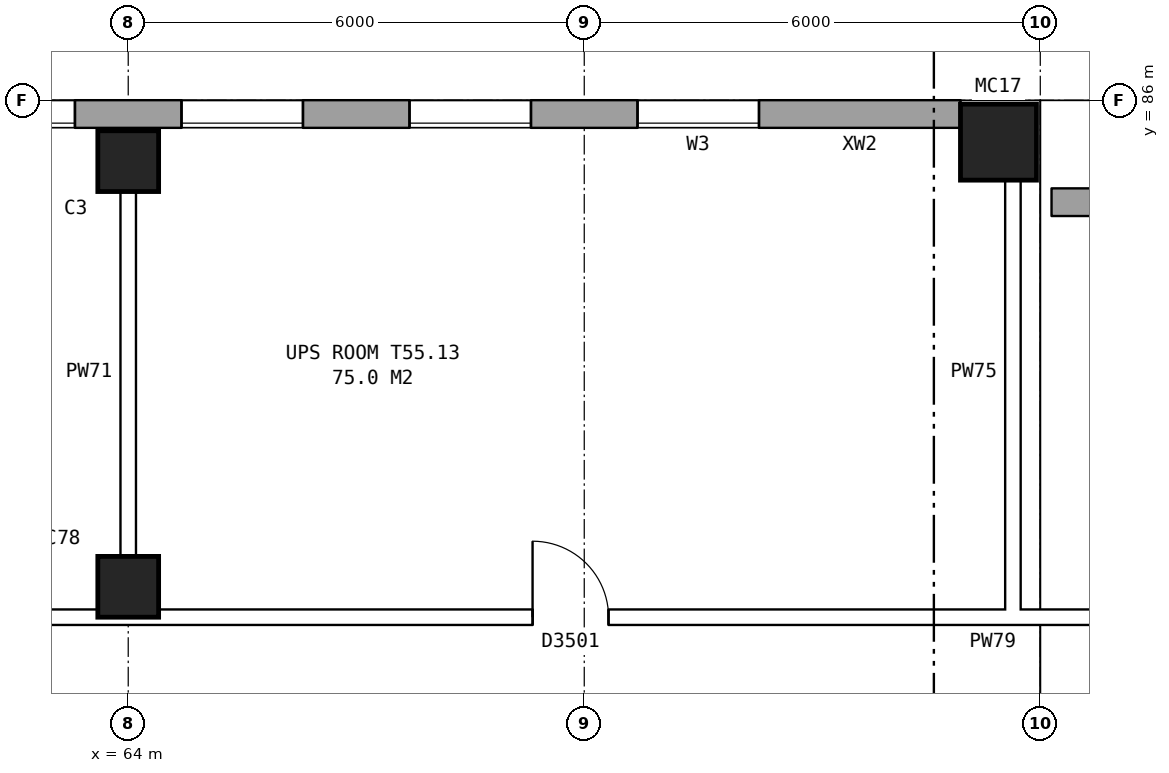
"""IFC4 building model, lengths in metres.
Left out: names, types, materials, properties, quantities, classifications, styles, units other than length and angle.
Written with IfcOpenShell. Run it as: python <this file> out.ifc"""

import sys

from ifc_helpers import new_model, si_unit, direction, frame, frame_2d, origin, origin_2d, place, context, subcontext, project, spatial, rectangle, hollow_rectangle, extrude, element, fill, save


model = new_model("IFC4")
c1 = context("Model", 3, precision=1e-05, world=origin(), true_north=direction((0.0, 1.0)))
c2 = subcontext(c1, "Body", "Model", "MODEL_VIEW")
j1 = project(units=[si_unit("LENGTHUNIT", "METRE"), si_unit("PLANEANGLEUNIT", "RADIAN")], contexts=[c1])
p1 = place(None, origin())
s1 = spatial("IfcSite", under=j1, at=p1, CompositionType="ELEMENT")
p2 = place(p1, origin())
s2 = spatial("IfcBuilding", under=s1, at=p2, CompositionType="ELEMENT")
p3 = place(p2, frame((0.0, 0.0, 194.4)))
s3 = spatial("IfcBuildingStorey", under=s2, at=p3, CompositionType="ELEMENT", Elevation=194.4)
for number, where, z_axis, x_axis in (
    (1, (64.0, 79.6, 0.0), (0.0, 0.0, 1.0), (1.0, 0.0, 0.0)),
    (2, (64.0, 85.2, 0.0), (0.0, 0.0, 1.0), (1.0, 0.0, 0.0)),
):
    element("IfcColumn", number, at=place(p3, frame(where, z_axis=z_axis, x_axis=x_axis)), inside=s3, PredefinedType="COLUMN", context=c2, shape_type="SweptSolid", body=[
        extrude(rectangle(XDim=0.8, YDim=0.8, at=origin_2d()), origin(), (0.0, 0.0, 1.0), 3.95),
    ])
p4 = place(p3, frame((75.45, 85.45, 0.0), z_axis=(0.0, 0.0, 1.0), x_axis=(1.0, 0.0, 0.0)))
e3 = element("IfcColumn", 3, at=p4, inside=s3, PredefinedType="COLUMN", context=c2, shape_type="SweptSolid", body=[
    extrude(hollow_rectangle(XDim=1.0, YDim=1.0, WallThickness=0.055, at=origin_2d()), origin(), (0.0, 0.0, 1.0), 4.2),
])
p5 = place(p3, frame((130.85, 84.66, 0.0), z_axis=(0.0, 0.0, 1.0), x_axis=(-1.0, 0.0, 0.0)))
e4 = element("IfcWall", 4, at=p5, inside=s3, PredefinedType="STANDARD", context=c2, shape_type="SweptSolid", body=[
    extrude(rectangle(XDim=54.7, YDim=0.36, at=frame_2d((27.35, 0.0))), origin(), (0.0, 0.0, 1.0), 3.95),
])
p6 = place(p5, frame((0.769, 0.0, 1.5)))
e5 = element("IfcOpeningElement", 5, at=p6, cuts=e4, PredefinedType="OPENING", context=c2, shape_type="SweptSolid", body=[
    extrude(rectangle(XDim=1.6, YDim=1.2, at=frame_2d((0.8, 0.6))), frame((0.0, 0.19, 0.0), z_axis=(0.0, -1.0, 0.0), x_axis=(1.0, 0.0, 0.0)), (0.0, 0.0, 1.0), 0.38),
])
p7 = place(p5, frame((2.7, 0.0, 1.5)))
e6 = element("IfcOpeningElement", 6, at=p7, cuts=e4, PredefinedType="OPENING", context=c2, shape_type="SweptSolid", body=[
    extrude(rectangle(XDim=0.6, YDim=1.2, at=frame_2d((0.3, 0.6))), frame((0.0, 0.19, 0.0), z_axis=(0.0, -1.0, 0.0), x_axis=(1.0, 0.0, 0.0)), (0.0, 0.0, 1.0), 0.38),
])
p8 = place(p5, frame((7.644, 0.0, 1.5)))
e7 = element("IfcOpeningElement", 7, at=p8, cuts=e4, PredefinedType="OPENING", context=c2, shape_type="SweptSolid", body=[
    extrude(rectangle(XDim=1.6, YDim=1.2, at=frame_2d((0.8, 0.6))), frame((0.0, 0.19, 0.0), z_axis=(0.0, -1.0, 0.0), x_axis=(1.0, 0.0, 0.0)), (0.0, 0.0, 1.0), 0.38),
])
p9 = place(p5, frame((5.3, 0.0, 1.5)))
e8 = element("IfcOpeningElement", 8, at=p9, cuts=e4, PredefinedType="OPENING", context=c2, shape_type="SweptSolid", body=[
    extrude(rectangle(XDim=1.6, YDim=1.2, at=frame_2d((0.8, 0.6))), frame((0.0, 0.19, 0.0), z_axis=(0.0, -1.0, 0.0), x_axis=(1.0, 0.0, 0.0)), (0.0, 0.0, 1.0), 0.38),
])
p10 = place(p5, frame((14.519, 0.0, 1.5)))
e9 = element("IfcOpeningElement", 9, at=p10, cuts=e4, PredefinedType="OPENING", context=c2, shape_type="SweptSolid", body=[
    extrude(rectangle(XDim=1.6, YDim=1.2, at=frame_2d((0.8, 0.6))), frame((0.0, 0.19, 0.0), z_axis=(0.0, -1.0, 0.0), x_axis=(1.0, 0.0, 0.0)), (0.0, 0.0, 1.0), 0.38),
])
p11 = place(p5, frame((16.45, 0.0, 1.5)))
e10 = element("IfcOpeningElement", 10, at=p11, cuts=e4, PredefinedType="OPENING", context=c2, shape_type="SweptSolid", body=[
    extrude(rectangle(XDim=0.6, YDim=1.2, at=frame_2d((0.3, 0.6))), frame((0.0, 0.19, 0.0), z_axis=(0.0, -1.0, 0.0), x_axis=(1.0, 0.0, 0.0)), (0.0, 0.0, 1.0), 0.38),
])
p12 = place(p5, frame((21.394, 0.0, 1.5)))
e11 = element("IfcOpeningElement", 11, at=p12, cuts=e4, PredefinedType="OPENING", context=c2, shape_type="SweptSolid", body=[
    extrude(rectangle(XDim=1.6, YDim=1.2, at=frame_2d((0.8, 0.6))), frame((0.0, 0.19, 0.0), z_axis=(0.0, -1.0, 0.0), x_axis=(1.0, 0.0, 0.0)), (0.0, 0.0, 1.0), 0.38),
])
p13 = place(p5, frame((19.05, 0.0, 1.5)))
e12 = element("IfcOpeningElement", 12, at=p13, cuts=e4, PredefinedType="OPENING", context=c2, shape_type="SweptSolid", body=[
    extrude(rectangle(XDim=1.6, YDim=1.2, at=frame_2d((0.8, 0.6))), frame((0.0, 0.19, 0.0), z_axis=(0.0, -1.0, 0.0), x_axis=(1.0, 0.0, 0.0)), (0.0, 0.0, 1.0), 0.38),
])
p14 = place(p5, frame((27.55, 0.0, 1.5)))
e13 = element("IfcOpeningElement", 13, at=p14, cuts=e4, PredefinedType="OPENING", context=c2, shape_type="SweptSolid", body=[
    extrude(rectangle(XDim=1.2, YDim=1.2, at=frame_2d((0.6, 0.6))), frame((0.0, 0.19, 0.0), z_axis=(0.0, -1.0, 0.0), x_axis=(1.0, 0.0, 0.0)), (0.0, 0.0, 1.0), 0.38),
])
p15 = place(p5, frame((31.706, 0.0, 1.5)))
e14 = element("IfcOpeningElement", 14, at=p15, cuts=e4, PredefinedType="OPENING", context=c2, shape_type="SweptSolid", body=[
    extrude(rectangle(XDim=1.6, YDim=1.2, at=frame_2d((0.8, 0.6))), frame((0.0, 0.19, 0.0), z_axis=(0.0, -1.0, 0.0), x_axis=(1.0, 0.0, 0.0)), (0.0, 0.0, 1.0), 0.38),
])
p16 = place(p5, frame((30.65, 0.0, 1.5)))
e15 = element("IfcOpeningElement", 15, at=p16, cuts=e4, PredefinedType="OPENING", context=c2, shape_type="SweptSolid", body=[
    extrude(rectangle(XDim=0.6, YDim=1.2, at=frame_2d((0.3, 0.6))), frame((0.0, 0.19, 0.0), z_axis=(0.0, -1.0, 0.0), x_axis=(1.0, 0.0, 0.0)), (0.0, 0.0, 1.0), 0.38),
])
p17 = place(p5, frame((38.581, 0.0, 1.5)))
e16 = element("IfcOpeningElement", 16, at=p17, cuts=e4, PredefinedType="OPENING", context=c2, shape_type="SweptSolid", body=[
    extrude(rectangle(XDim=1.6, YDim=1.2, at=frame_2d((0.8, 0.6))), frame((0.0, 0.19, 0.0), z_axis=(0.0, -1.0, 0.0), x_axis=(1.0, 0.0, 0.0)), (0.0, 0.0, 1.0), 0.38),
])
p18 = place(p5, frame((41.3, 0.0, 1.5)))
e17 = element("IfcOpeningElement", 17, at=p18, cuts=e4, PredefinedType="OPENING", context=c2, shape_type="SweptSolid", body=[
    extrude(rectangle(XDim=1.2, YDim=1.2, at=frame_2d((0.6, 0.6))), frame((0.0, 0.19, 0.0), z_axis=(0.0, -1.0, 0.0), x_axis=(1.0, 0.0, 0.0)), (0.0, 0.0, 1.0), 0.38),
])
p19 = place(p5, frame((45.456, 0.0, 1.5)))
e18 = element("IfcOpeningElement", 18, at=p19, cuts=e4, PredefinedType="OPENING", context=c2, shape_type="SweptSolid", body=[
    extrude(rectangle(XDim=1.6, YDim=1.2, at=frame_2d((0.8, 0.6))), frame((0.0, 0.19, 0.0), z_axis=(0.0, -1.0, 0.0), x_axis=(1.0, 0.0, 0.0)), (0.0, 0.0, 1.0), 0.38),
])
p20 = place(p5, frame((44.4, 0.0, 1.5)))
e19 = element("IfcOpeningElement", 19, at=p20, cuts=e4, PredefinedType="OPENING", context=c2, shape_type="SweptSolid", body=[
    extrude(rectangle(XDim=0.6, YDim=1.2, at=frame_2d((0.3, 0.6))), frame((0.0, 0.19, 0.0), z_axis=(0.0, -1.0, 0.0), x_axis=(1.0, 0.0, 0.0)), (0.0, 0.0, 1.0), 0.38),
])
p21 = place(p5, frame((52.331, 0.0, 1.5)))
e20 = element("IfcOpeningElement", 20, at=p21, cuts=e4, PredefinedType="OPENING", context=c2, shape_type="SweptSolid", body=[
    extrude(rectangle(XDim=1.6, YDim=1.2, at=frame_2d((0.8, 0.6))), frame((0.0, 0.19, 0.0), z_axis=(0.0, -1.0, 0.0), x_axis=(1.0, 0.0, 0.0)), (0.0, 0.0, 1.0), 0.38),
])
p22 = place(p5, frame((9.55, 0.0, 1.5)))
e21 = element("IfcOpeningElement", 21, at=p22, cuts=e4, PredefinedType="OPENING", context=c2, shape_type="SweptSolid", body=[
    extrude(rectangle(XDim=0.6, YDim=1.2, at=frame_2d((0.3, 0.6))), frame((0.0, 0.19, 0.0), z_axis=(0.0, -1.0, 0.0), x_axis=(1.0, 0.0, 0.0)), (0.0, 0.0, 1.0), 0.38),
])
p23 = place(p5, frame((12.15, 0.0, 1.5)))
e22 = element("IfcOpeningElement", 22, at=p23, cuts=e4, PredefinedType="OPENING", context=c2, shape_type="SweptSolid", body=[
    extrude(rectangle(XDim=1.2, YDim=1.2, at=frame_2d((0.6, 0.6))), frame((0.0, 0.19, 0.0), z_axis=(0.0, -1.0, 0.0), x_axis=(1.0, 0.0, 0.0)), (0.0, 0.0, 1.0), 0.38),
])
p24 = place(p5, frame((23.3, 0.0, 1.5)))
e23 = element("IfcOpeningElement", 23, at=p24, cuts=e4, PredefinedType="OPENING", context=c2, shape_type="SweptSolid", body=[
    extrude(rectangle(XDim=0.6, YDim=1.2, at=frame_2d((0.3, 0.6))), frame((0.0, 0.19, 0.0), z_axis=(0.0, -1.0, 0.0), x_axis=(1.0, 0.0, 0.0)), (0.0, 0.0, 1.0), 0.38),
])
p25 = place(p5, frame((25.9, 0.0, 1.5)))
e24 = element("IfcOpeningElement", 24, at=p25, cuts=e4, PredefinedType="OPENING", context=c2, shape_type="SweptSolid", body=[
    extrude(rectangle(XDim=1.2, YDim=1.2, at=frame_2d((0.6, 0.6))), frame((0.0, 0.19, 0.0), z_axis=(0.0, -1.0, 0.0), x_axis=(1.0, 0.0, 0.0)), (0.0, 0.0, 1.0), 0.38),
])
p26 = place(p5, frame((33.65, 0.0, 1.5)))
e25 = element("IfcOpeningElement", 25, at=p26, cuts=e4, PredefinedType="OPENING", context=c2, shape_type="SweptSolid", body=[
    extrude(rectangle(XDim=1.6, YDim=1.2, at=frame_2d((0.8, 0.6))), frame((0.0, 0.19, 0.0), z_axis=(0.0, -1.0, 0.0), x_axis=(1.0, 0.0, 0.0)), (0.0, 0.0, 1.0), 0.38),
])
p27 = place(p5, frame((37.5, 0.0, 1.5)))
e26 = element("IfcOpeningElement", 26, at=p27, cuts=e4, PredefinedType="OPENING", context=c2, shape_type="SweptSolid", body=[
    extrude(rectangle(XDim=0.6, YDim=1.2, at=frame_2d((0.3, 0.6))), frame((0.0, 0.19, 0.0), z_axis=(0.0, -1.0, 0.0), x_axis=(1.0, 0.0, 0.0)), (0.0, 0.0, 1.0), 0.38),
])
p28 = place(p5, frame((47.4, 0.0, 1.5)))
e27 = element("IfcOpeningElement", 27, at=p28, cuts=e4, PredefinedType="OPENING", context=c2, shape_type="SweptSolid", body=[
    extrude(rectangle(XDim=1.6, YDim=1.2, at=frame_2d((0.8, 0.6))), frame((0.0, 0.19, 0.0), z_axis=(0.0, -1.0, 0.0), x_axis=(1.0, 0.0, 0.0)), (0.0, 0.0, 1.0), 0.38),
])
p29 = place(p5, frame((51.25, 0.0, 1.5)))
e28 = element("IfcOpeningElement", 28, at=p29, cuts=e4, PredefinedType="OPENING", context=c2, shape_type="SweptSolid", body=[
    extrude(rectangle(XDim=0.6, YDim=1.2, at=frame_2d((0.3, 0.6))), frame((0.0, 0.19, 0.0), z_axis=(0.0, -1.0, 0.0), x_axis=(1.0, 0.0, 0.0)), (0.0, 0.0, 1.0), 0.38),
])
p30 = place(p3, frame((74.95, 85.82, 0.0), z_axis=(0.0, 0.0, 1.0), x_axis=(-1.0, 0.0, 0.0)))
e29 = element("IfcWall", 29, at=p30, inside=s3, PredefinedType="STANDARD", context=c2, shape_type="SweptSolid", body=[
    extrude(rectangle(XDim=39.875, YDim=0.36, at=frame_2d((19.938, 0.0))), origin(), (0.0, 0.0, 1.0), 3.95),
])
p31 = place(p30, frame((2.65, 0.0, 1.5)))
e30 = element("IfcOpeningElement", 30, at=p31, cuts=e29, PredefinedType="OPENING", context=c2, shape_type="SweptSolid", body=[
    extrude(rectangle(XDim=1.6, YDim=1.2, at=frame_2d((0.8, 0.6))), frame((0.0, 0.19, 0.0), z_axis=(0.0, -1.0, 0.0), x_axis=(1.0, 0.0, 0.0)), (0.0, 0.0, 1.0), 0.38),
])
p32 = place(p30, frame((5.65, 0.0, 1.5)))
e31 = element("IfcOpeningElement", 31, at=p32, cuts=e29, PredefinedType="OPENING", context=c2, shape_type="SweptSolid", body=[
    extrude(rectangle(XDim=1.6, YDim=1.2, at=frame_2d((0.8, 0.6))), frame((0.0, 0.19, 0.0), z_axis=(0.0, -1.0, 0.0), x_axis=(1.0, 0.0, 0.0)), (0.0, 0.0, 1.0), 0.38),
])
p33 = place(p30, frame((8.65, 0.0, 1.5)))
e32 = element("IfcOpeningElement", 32, at=p33, cuts=e29, PredefinedType="OPENING", context=c2, shape_type="SweptSolid", body=[
    extrude(rectangle(XDim=1.6, YDim=1.2, at=frame_2d((0.8, 0.6))), frame((0.0, 0.19, 0.0), z_axis=(0.0, -1.0, 0.0), x_axis=(1.0, 0.0, 0.0)), (0.0, 0.0, 1.0), 0.38),
])
p34 = place(p30, frame((11.65, 0.0, 1.5)))
e33 = element("IfcOpeningElement", 33, at=p34, cuts=e29, PredefinedType="OPENING", context=c2, shape_type="SweptSolid", body=[
    extrude(rectangle(XDim=1.6, YDim=1.2, at=frame_2d((0.8, 0.6))), frame((0.0, 0.19, 0.0), z_axis=(0.0, -1.0, 0.0), x_axis=(1.0, 0.0, 0.0)), (0.0, 0.0, 1.0), 0.38),
])
p35 = place(p30, frame((14.65, 0.0, 1.5)))
e34 = element("IfcOpeningElement", 34, at=p35, cuts=e29, PredefinedType="OPENING", context=c2, shape_type="SweptSolid", body=[
    extrude(rectangle(XDim=1.6, YDim=1.2, at=frame_2d((0.8, 0.6))), frame((0.0, 0.19, 0.0), z_axis=(0.0, -1.0, 0.0), x_axis=(1.0, 0.0, 0.0)), (0.0, 0.0, 1.0), 0.38),
])
p36 = place(p30, frame((17.65, 0.0, 1.5)))
e35 = element("IfcOpeningElement", 35, at=p36, cuts=e29, PredefinedType="OPENING", context=c2, shape_type="SweptSolid", body=[
    extrude(rectangle(XDim=1.6, YDim=1.2, at=frame_2d((0.8, 0.6))), frame((0.0, 0.19, 0.0), z_axis=(0.0, -1.0, 0.0), x_axis=(1.0, 0.0, 0.0)), (0.0, 0.0, 1.0), 0.38),
])
p37 = place(p30, frame((20.65, 0.0, 1.5)))
e36 = element("IfcOpeningElement", 36, at=p37, cuts=e29, PredefinedType="OPENING", context=c2, shape_type="SweptSolid", body=[
    extrude(rectangle(XDim=1.6, YDim=1.2, at=frame_2d((0.8, 0.6))), frame((0.0, 0.19, 0.0), z_axis=(0.0, -1.0, 0.0), x_axis=(1.0, 0.0, 0.0)), (0.0, 0.0, 1.0), 0.38),
])
p38 = place(p30, frame((23.65, 0.0, 1.5)))
e37 = element("IfcOpeningElement", 37, at=p38, cuts=e29, PredefinedType="OPENING", context=c2, shape_type="SweptSolid", body=[
    extrude(rectangle(XDim=1.6, YDim=1.2, at=frame_2d((0.8, 0.6))), frame((0.0, 0.19, 0.0), z_axis=(0.0, -1.0, 0.0), x_axis=(1.0, 0.0, 0.0)), (0.0, 0.0, 1.0), 0.38),
])
p39 = place(p30, frame((26.65, 0.0, 1.5)))
e38 = element("IfcOpeningElement", 38, at=p39, cuts=e29, PredefinedType="OPENING", context=c2, shape_type="SweptSolid", body=[
    extrude(rectangle(XDim=1.6, YDim=1.2, at=frame_2d((0.8, 0.6))), frame((0.0, 0.19, 0.0), z_axis=(0.0, -1.0, 0.0), x_axis=(1.0, 0.0, 0.0)), (0.0, 0.0, 1.0), 0.38),
])
p40 = place(p30, frame((29.65, 0.0, 1.5)))
e39 = element("IfcOpeningElement", 39, at=p40, cuts=e29, PredefinedType="OPENING", context=c2, shape_type="SweptSolid", body=[
    extrude(rectangle(XDim=1.6, YDim=1.2, at=frame_2d((0.8, 0.6))), frame((0.0, 0.19, 0.0), z_axis=(0.0, -1.0, 0.0), x_axis=(1.0, 0.0, 0.0)), (0.0, 0.0, 1.0), 0.38),
])
p41 = place(p30, frame((32.65, 0.0, 1.5)))
e40 = element("IfcOpeningElement", 40, at=p41, cuts=e29, PredefinedType="OPENING", context=c2, shape_type="SweptSolid", body=[
    extrude(rectangle(XDim=1.6, YDim=1.2, at=frame_2d((0.8, 0.6))), frame((0.0, 0.19, 0.0), z_axis=(0.0, -1.0, 0.0), x_axis=(1.0, 0.0, 0.0)), (0.0, 0.0, 1.0), 0.38),
])
p42 = place(p30, frame((35.65, 0.0, 1.5)))
e41 = element("IfcOpeningElement", 41, at=p42, cuts=e29, PredefinedType="OPENING", context=c2, shape_type="SweptSolid", body=[
    extrude(rectangle(XDim=1.6, YDim=1.2, at=frame_2d((0.8, 0.6))), frame((0.0, 0.19, 0.0), z_axis=(0.0, -1.0, 0.0), x_axis=(1.0, 0.0, 0.0)), (0.0, 0.0, 1.0), 0.38),
])
p43 = place(p3, frame((32.24, 79.2, 0.0), z_axis=(0.0, 0.0, 1.0), x_axis=(1.0, 0.0, 0.0)))
e42 = element("IfcWall", 42, at=p43, inside=s3, PredefinedType="PARTITIONING", context=c2, shape_type="SweptSolid", body=[
    extrude(rectangle(XDim=57.61, YDim=0.2, at=frame_2d((28.805, 0.0))), origin(), (0.0, 0.0, 1.0), 3.95),
])
p44 = place(p43, frame((3.44, 0.0, 0.0)))
e43 = element("IfcOpeningElement", 43, at=p44, cuts=e42, PredefinedType="OPENING", context=c2, shape_type="SweptSolid", body=[
    extrude(rectangle(XDim=1.0, YDim=2.1, at=frame_2d((0.5, 1.05))), frame((0.0, 0.11, 0.0), z_axis=(0.0, -1.0, 0.0), x_axis=(1.0, 0.0, 0.0)), (0.0, 0.0, 1.0), 0.22),
])
p45 = place(p43, frame((13.26, 0.0, 0.0)))
e44 = element("IfcOpeningElement", 44, at=p45, cuts=e42, PredefinedType="OPENING", context=c2, shape_type="SweptSolid", body=[
    extrude(rectangle(XDim=1.0, YDim=2.1, at=frame_2d((0.5, 1.05))), frame((0.0, 0.11, 0.0), z_axis=(0.0, -1.0, 0.0), x_axis=(1.0, 0.0, 0.0)), (0.0, 0.0, 1.0), 0.22),
])
p46 = place(p43, frame((25.26, 0.0, 0.0)))
e45 = element("IfcOpeningElement", 45, at=p46, cuts=e42, PredefinedType="OPENING", context=c2, shape_type="SweptSolid", body=[
    extrude(rectangle(XDim=1.0, YDim=2.1, at=frame_2d((0.5, 1.05))), frame((0.0, 0.11, 0.0), z_axis=(0.0, -1.0, 0.0), x_axis=(1.0, 0.0, 0.0)), (0.0, 0.0, 1.0), 0.22),
])
p47 = place(p43, frame((37.08, 0.0, 0.0)))
e46 = element("IfcOpeningElement", 46, at=p47, cuts=e42, PredefinedType="OPENING", context=c2, shape_type="SweptSolid", body=[
    extrude(rectangle(XDim=1.0, YDim=2.1, at=frame_2d((0.5, 1.05))), frame((0.0, 0.11, 0.0), z_axis=(0.0, -1.0, 0.0), x_axis=(1.0, 0.0, 0.0)), (0.0, 0.0, 1.0), 0.22),
])
p48 = place(p43, frame((49.955, 0.0, 0.0)))
e47 = element("IfcOpeningElement", 47, at=p48, cuts=e42, PredefinedType="OPENING", context=c2, shape_type="SweptSolid", body=[
    extrude(rectangle(XDim=1.0, YDim=2.1, at=frame_2d((0.5, 1.05))), frame((0.0, 0.11, 0.0), z_axis=(0.0, -1.0, 0.0), x_axis=(1.0, 0.0, 0.0)), (0.0, 0.0, 1.0), 0.22),
])
for number, where, z_axis, x_axis in (
    (48, (64.0, 79.1, 0.0), (0.0, 0.0, 1.0), (0.0, 1.0, 0.0)),
    (49, (75.64, 79.1, 0.0), (0.0, 0.0, 1.0), (0.0, 1.0, 0.0)),
):
    element("IfcWall", number, at=place(p3, frame(where, z_axis=z_axis, x_axis=x_axis)), inside=s3, PredefinedType="PARTITIONING", context=c2, shape_type="SweptSolid", body=[
        extrude(rectangle(XDim=6.66, YDim=0.2, at=frame_2d((3.33, 0.0))), origin(), (0.0, 0.0, 1.0), 3.95),
    ])
p49 = place(p31, origin())
e50 = element("IfcWindow", 50, at=p49, inside=s3, PartitioningType="DOUBLE_PANEL_HORIZONTAL", PredefinedType="WINDOW", context=c2, shape_type="SweptSolid", body=[
    extrude(rectangle(XDim=1.6, YDim=1.2, at=frame_2d((0.8, 0.6))), frame((0.0, 0.15, 0.0), z_axis=(0.0, -1.0, 0.0), x_axis=(1.0, 0.0, 0.0)), (0.0, 0.0, 1.0), 0.06),
])
fill(e30, e50)
p50 = place(p32, origin())
e51 = element("IfcWindow", 51, at=p50, inside=s3, PartitioningType="DOUBLE_PANEL_HORIZONTAL", PredefinedType="WINDOW", context=c2, shape_type="SweptSolid", body=[
    extrude(rectangle(XDim=1.6, YDim=1.2, at=frame_2d((0.8, 0.6))), frame((0.0, 0.15, 0.0), z_axis=(0.0, -1.0, 0.0), x_axis=(1.0, 0.0, 0.0)), (0.0, 0.0, 1.0), 0.06),
])
fill(e31, e51)
p51 = place(p33, origin())
e52 = element("IfcWindow", 52, at=p51, inside=s3, PartitioningType="DOUBLE_PANEL_HORIZONTAL", PredefinedType="WINDOW", context=c2, shape_type="SweptSolid", body=[
    extrude(rectangle(XDim=1.6, YDim=1.2, at=frame_2d((0.8, 0.6))), frame((0.0, 0.15, 0.0), z_axis=(0.0, -1.0, 0.0), x_axis=(1.0, 0.0, 0.0)), (0.0, 0.0, 1.0), 0.06),
])
fill(e32, e52)
p52 = place(p34, origin())
e53 = element("IfcWindow", 53, at=p52, inside=s3, PartitioningType="DOUBLE_PANEL_HORIZONTAL", PredefinedType="WINDOW", context=c2, shape_type="SweptSolid", body=[
    extrude(rectangle(XDim=1.6, YDim=1.2, at=frame_2d((0.8, 0.6))), frame((0.0, 0.15, 0.0), z_axis=(0.0, -1.0, 0.0), x_axis=(1.0, 0.0, 0.0)), (0.0, 0.0, 1.0), 0.06),
])
fill(e33, e53)
p53 = place(p47, origin())
e54 = element("IfcDoor", 54, at=p53, inside=s3, OperationType="SINGLE_SWING_LEFT", PredefinedType="DOOR", context=c2, shape_type="SweptSolid", body=[
    extrude(rectangle(XDim=1.0, YDim=2.1, at=frame_2d((0.5, 1.05))), frame((0.0, 0.025, 0.0), z_axis=(0.0, -1.0, 0.0), x_axis=(1.0, 0.0, 0.0)), (0.0, 0.0, 1.0), 0.05),
])
fill(e46, e54)
save(model, sys.argv[1])
